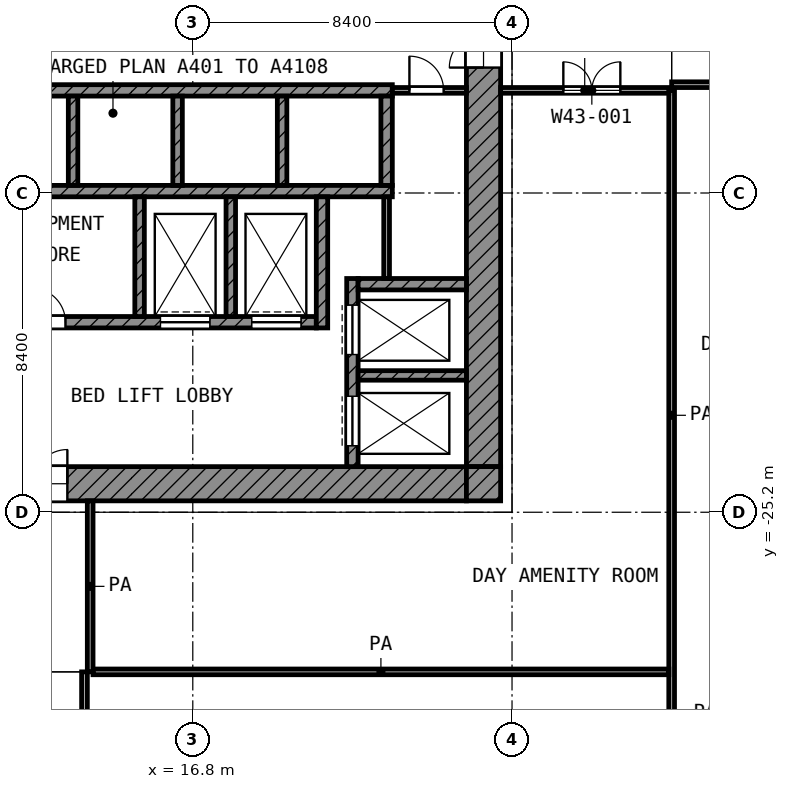
"""IFC4 building model, lengths in metres.
Left out: names, types, materials, properties, quantities, classifications, styles, units other than length and angle.
Written with IfcOpenShell. Run it as: python <this file> out.ifc"""

import sys

from ifc_helpers import new_model, si_unit, direction, frame, frame_2d, origin, place, context, subcontext, project, spatial, rectangle, extrude, element, fill, save


model = new_model("IFC4")
c1 = context("Model", 3, precision=1e-05, world=origin(), true_north=direction((0.0, 1.0)))
c2 = subcontext(c1, "Body", "Model", "MODEL_VIEW")
j1 = project(units=[si_unit("LENGTHUNIT", "METRE"), si_unit("PLANEANGLEUNIT", "RADIAN")], contexts=[c1])
p1 = place(None, origin())
s1 = spatial("IfcSite", under=j1, at=p1, CompositionType="ELEMENT")
p2 = place(p1, origin())
s2 = spatial("IfcBuilding", under=s1, at=p2, CompositionType="ELEMENT")
p3 = place(p2, frame((0.0, 0.0, 187.8)))
s3 = spatial("IfcBuildingStorey", under=s2, at=p3, CompositionType="ELEMENT", Elevation=187.8)
p4 = place(p3, frame((24.45, -24.0, 0.0), z_axis=(0.0, 0.0, 1.0), x_axis=(0.0, 1.0, 0.0)))
e1 = element("IfcWall", 1, at=p4, inside=s3, PredefinedType="SHEAR", context=c2, shape_type="SweptSolid", body=[
    extrude(rectangle(XDim=18.6, YDim=0.9, at=frame_2d((9.3, 0.0))), origin(), (0.0, 0.0, 1.0), 3.6),
])
p5 = place(p4, frame((10.5, 0.0, 0.0)))
e2 = element("IfcOpeningElement", 2, at=p5, cuts=e1, PredefinedType="OPENING", context=c2, shape_type="SweptSolid", body=[
    extrude(rectangle(XDim=1.8, YDim=2.1, at=frame_2d((0.9, 1.05))), frame((0.0, 0.46, 0.0), z_axis=(0.0, -1.0, 0.0), x_axis=(1.0, 0.0, 0.0)), (0.0, 0.0, 1.0), 0.92),
])
p6 = place(p3, frame((5.4, -24.45, 0.0), z_axis=(0.0, 0.0, 1.0), x_axis=(1.0, 0.0, 0.0)))
e3 = element("IfcWall", 3, at=p6, inside=s3, PredefinedType="SHEAR", context=c2, shape_type="SweptSolid", body=[
    extrude(rectangle(XDim=18.6, YDim=0.9, at=frame_2d((9.3, 0.0))), origin(), (0.0, 0.0, 1.0), 3.6),
])
p7 = place(p6, frame((6.3, 0.0, 0.0)))
e4 = element("IfcOpeningElement", 4, at=p7, cuts=e3, PredefinedType="OPENING", context=c2, shape_type="SweptSolid", body=[
    extrude(rectangle(XDim=1.8, YDim=2.1, at=frame_2d((0.9, 1.05))), frame((0.0, 0.46, 0.0), z_axis=(0.0, -1.0, 0.0), x_axis=(1.0, 0.0, 0.0)), (0.0, 0.0, 1.0), 0.92),
])
p8 = place(p3, frame((24.45, -24.9, 0.0), z_axis=(0.0, 0.0, 1.0), x_axis=(0.0, 1.0, 0.0)))
e5 = element("IfcWall", 5, at=p8, inside=s3, PredefinedType="SHEAR", context=c2, shape_type="SweptSolid", body=[
    extrude(rectangle(XDim=0.9, YDim=0.9, at=frame_2d((0.45, 0.0))), origin(), (0.0, 0.0, 1.0), 3.6),
])
p9 = place(p3, frame((5.4, -14.1, 0.0), z_axis=(0.0, 0.0, 1.0), x_axis=(1.0, 0.0, 0.0)))
e6 = element("IfcWall", 6, at=p9, inside=s3, PredefinedType="SHEAR", context=c2, shape_type="SweptSolid", body=[
    extrude(rectangle(XDim=16.65, YDim=0.3, at=frame_2d((8.325, 0.0))), origin(), (0.0, 0.0, 1.0), 3.6),
])
p10 = place(p9, frame((0.825, 0.0, 0.0)))
e7 = element("IfcOpeningElement", 7, at=p10, cuts=e6, PredefinedType="OPENING", context=c2, shape_type="SweptSolid", body=[
    extrude(rectangle(XDim=1.1, YDim=2.1, at=frame_2d((0.55, 1.05))), frame((0.0, 0.16, 0.0), z_axis=(0.0, -1.0, 0.0), x_axis=(1.0, 0.0, 0.0)), (0.0, 0.0, 1.0), 0.32),
])
p11 = place(p9, frame((3.575, 0.0, 0.0)))
e8 = element("IfcOpeningElement", 8, at=p11, cuts=e6, PredefinedType="OPENING", context=c2, shape_type="SweptSolid", body=[
    extrude(rectangle(XDim=1.1, YDim=2.1, at=frame_2d((0.55, 1.05))), frame((0.0, 0.16, 0.0), z_axis=(0.0, -1.0, 0.0), x_axis=(1.0, 0.0, 0.0)), (0.0, 0.0, 1.0), 0.32),
])
p12 = place(p3, frame((5.4, -16.75, 0.0), z_axis=(0.0, 0.0, 1.0), x_axis=(1.0, 0.0, 0.0)))
e9 = element("IfcWall", 9, at=p12, inside=s3, PredefinedType="SHEAR", context=c2, shape_type="SweptSolid", body=[
    extrude(rectangle(XDim=16.65, YDim=0.3, at=frame_2d((8.325, 0.0))), origin(), (0.0, 0.0, 1.0), 3.6),
])
p13 = place(p3, frame((5.4, -20.2, 0.0), z_axis=(0.0, 0.0, 1.0), x_axis=(1.0, 0.0, 0.0)))
e10 = element("IfcWall", 10, at=p13, inside=s3, PredefinedType="SHEAR", context=c2, shape_type="SweptSolid", body=[
    extrude(rectangle(XDim=14.65, YDim=0.3, at=frame_2d((7.325, 0.0))), origin(), (0.0, 0.0, 1.0), 3.6),
])
p14 = place(p13, frame((10.55, 0.0, 0.0)))
e11 = element("IfcOpeningElement", 11, at=p14, cuts=e10, PredefinedType="OPENING", context=c2, shape_type="SweptSolid", body=[
    extrude(rectangle(XDim=1.3, YDim=2.1, at=frame_2d((0.65, 1.05))), frame((0.0, 0.16, 0.0), z_axis=(0.0, -1.0, 0.0), x_axis=(1.0, 0.0, 0.0)), (0.0, 0.0, 1.0), 0.32),
])
p15 = place(p13, frame((12.95, 0.0, 0.0)))
e12 = element("IfcOpeningElement", 12, at=p15, cuts=e10, PredefinedType="OPENING", context=c2, shape_type="SweptSolid", body=[
    extrude(rectangle(XDim=1.3, YDim=2.1, at=frame_2d((0.65, 1.05))), frame((0.0, 0.16, 0.0), z_axis=(0.0, -1.0, 0.0), x_axis=(1.0, 0.0, 0.0)), (0.0, 0.0, 1.0), 0.32),
])
p16 = place(p13, frame((0.55, 0.0, 0.0)))
e13 = element("IfcOpeningElement", 13, at=p16, cuts=e10, PredefinedType="OPENING", context=c2, shape_type="SweptSolid", body=[
    extrude(rectangle(XDim=1.3, YDim=2.1, at=frame_2d((0.65, 1.05))), frame((0.0, 0.16, 0.0), z_axis=(0.0, -1.0, 0.0), x_axis=(1.0, 0.0, 0.0)), (0.0, 0.0, 1.0), 0.32),
])
p17 = place(p13, frame((2.95, 0.0, 0.0)))
e14 = element("IfcOpeningElement", 14, at=p17, cuts=e10, PredefinedType="OPENING", context=c2, shape_type="SweptSolid", body=[
    extrude(rectangle(XDim=1.3, YDim=2.1, at=frame_2d((0.65, 1.05))), frame((0.0, 0.16, 0.0), z_axis=(0.0, -1.0, 0.0), x_axis=(1.0, 0.0, 0.0)), (0.0, 0.0, 1.0), 0.32),
])
p18 = place(p13, frame((7.15, 0.0, 0.0)))
e15 = element("IfcOpeningElement", 15, at=p18, cuts=e10, PredefinedType="OPENING", context=c2, shape_type="SweptSolid", body=[
    extrude(rectangle(XDim=0.9, YDim=2.1, at=frame_2d((0.45, 1.05))), frame((0.0, 0.16, 0.0), z_axis=(0.0, -1.0, 0.0), x_axis=(1.0, 0.0, 0.0)), (0.0, 0.0, 1.0), 0.32),
])
p19 = place(p3, frame((20.2, -20.35, 0.0), z_axis=(0.0, 0.0, 1.0), x_axis=(0.0, 1.0, 0.0)))
e16 = element("IfcWall", 16, at=p19, inside=s3, PredefinedType="SHEAR", context=c2, shape_type="SweptSolid", body=[
    extrude(rectangle(XDim=3.45, YDim=0.3, at=frame_2d((1.725, 0.0))), origin(), (0.0, 0.0, 1.0), 3.6),
])
p20 = place(p3, frame((21.9, -16.6, 0.0), z_axis=(0.0, 0.0, 1.0), x_axis=(0.0, 1.0, 0.0)))
e17 = element("IfcWall", 17, at=p20, inside=s3, PredefinedType="SHEAR", context=c2, shape_type="SweptSolid", body=[
    extrude(rectangle(XDim=2.35, YDim=0.3, at=frame_2d((1.175, 0.0))), origin(), (0.0, 0.0, 1.0), 3.6),
])
p21 = place(p3, frame((21.15, -19.2, 0.0), z_axis=(0.0, 0.0, 1.0), x_axis=(1.0, 0.0, 0.0)))
e18 = element("IfcWall", 18, at=p21, inside=s3, PredefinedType="SHEAR", context=c2, shape_type="SweptSolid", body=[
    extrude(rectangle(XDim=2.85, YDim=0.3, at=frame_2d((1.425, 0.0))), origin(), (0.0, 0.0, 1.0), 3.6),
])
p22 = place(p3, frame((21.0, -24.0, 0.0), z_axis=(0.0, 0.0, 1.0), x_axis=(0.0, 1.0, 0.0)))
e19 = element("IfcWall", 19, at=p22, inside=s3, PredefinedType="SHEAR", context=c2, shape_type="SweptSolid", body=[
    extrude(rectangle(XDim=4.95, YDim=0.3, at=frame_2d((2.475, 0.0))), origin(), (0.0, 0.0, 1.0), 3.6),
])
p23 = place(p22, frame((2.95, 0.0, 0.0)))
e20 = element("IfcOpeningElement", 20, at=p23, cuts=e19, PredefinedType="OPENING", context=c2, shape_type="SweptSolid", body=[
    extrude(rectangle(XDim=1.3, YDim=2.1, at=frame_2d((0.65, 1.05))), frame((0.0, 0.16, 0.0), z_axis=(0.0, -1.0, 0.0), x_axis=(1.0, 0.0, 0.0)), (0.0, 0.0, 1.0), 0.32),
])
p24 = place(p22, frame((0.55, 0.0, 0.0)))
e21 = element("IfcOpeningElement", 21, at=p24, cuts=e19, PredefinedType="OPENING", context=c2, shape_type="SweptSolid", body=[
    extrude(rectangle(XDim=1.3, YDim=2.1, at=frame_2d((0.65, 1.05))), frame((0.0, 0.16, 0.0), z_axis=(0.0, -1.0, 0.0), x_axis=(1.0, 0.0, 0.0)), (0.0, 0.0, 1.0), 0.32),
])
p25 = place(p3, frame((21.15, -21.6, 0.0), z_axis=(0.0, 0.0, 1.0), x_axis=(1.0, 0.0, 0.0)))
e22 = element("IfcWall", 22, at=p25, inside=s3, PredefinedType="SHEAR", context=c2, shape_type="SweptSolid", body=[
    extrude(rectangle(XDim=2.85, YDim=0.25, at=frame_2d((1.425, 0.0))), origin(), (0.0, 0.0, 1.0), 3.6),
])
for number, where, z_axis, x_axis in (
    (23, (15.4, -20.05, 0.0), (0.0, 0.0, 1.0), (0.0, 1.0, 0.0)),
    (24, (17.8, -20.05, 0.0), (0.0, 0.0, 1.0), (0.0, 1.0, 0.0)),
):
    element("IfcWall", number, at=place(p3, frame(where, z_axis=z_axis, x_axis=x_axis)), inside=s3, PredefinedType="SHEAR", context=c2, shape_type="SweptSolid", body=[
        extrude(rectangle(XDim=3.15, YDim=0.25, at=frame_2d((1.575, 0.0))), origin(), (0.0, 0.0, 1.0), 3.6),
    ])
for number, where, z_axis, x_axis in (
    (25, (13.65, -16.6, 0.0), (0.0, 0.0, 1.0), (0.0, 1.0, 0.0)),
    (26, (16.4, -16.6, 0.0), (0.0, 0.0, 1.0), (0.0, 1.0, 0.0)),
    (27, (19.15, -16.6, 0.0), (0.0, 0.0, 1.0), (0.0, 1.0, 0.0)),
):
    element("IfcWall", number, at=place(p3, frame(where, z_axis=z_axis, x_axis=x_axis)), inside=s3, PredefinedType="SHEAR", context=c2, shape_type="SweptSolid", body=[
        extrude(rectangle(XDim=2.35, YDim=0.25, at=frame_2d((1.175, 0.0))), origin(), (0.0, 0.0, 1.0), 3.6),
    ])
p26 = place(p3, frame((21.9, -19.05, 0.0), z_axis=(0.0, 0.0, 1.0), x_axis=(0.0, 1.0, 0.0)))
e28 = element("IfcWall", 28, at=p26, inside=s3, PredefinedType="PARTITIONING", context=c2, shape_type="SweptSolid", body=[
    extrude(rectangle(XDim=2.15, YDim=0.15, at=frame_2d((1.075, 0.0))), origin(), (0.0, 0.0, 1.0), 3.6),
])
p27 = place(p3, frame((22.05, -14.1, 0.0), z_axis=(0.0, 0.0, 1.0), x_axis=(1.0, 0.0, 0.0)))
e29 = element("IfcWall", 29, at=p27, inside=s3, PredefinedType="PARTITIONING", context=c2, shape_type="SweptSolid", body=[
    extrude(rectangle(XDim=1.95, YDim=0.15, at=frame_2d((0.975, 0.0))), origin(), (0.0, 0.0, 1.0), 3.6),
])
p28 = place(p27, frame((0.45, 0.0, 0.0)))
e30 = element("IfcOpeningElement", 30, at=p28, cuts=e29, PredefinedType="OPENING", context=c2, shape_type="SweptSolid", body=[
    extrude(rectangle(XDim=0.9, YDim=2.1, at=frame_2d((0.45, 1.05))), frame((0.0, 0.085, 0.0), z_axis=(0.0, -1.0, 0.0), x_axis=(1.0, 0.0, 0.0)), (0.0, 0.0, 1.0), 0.17),
])
p29 = place(p3, frame((14.175, -29.4, 0.0), z_axis=(0.0, 0.0, 1.0), x_axis=(1.0, 0.0, 0.0)))
e31 = element("IfcWall", 31, at=p29, inside=s3, PredefinedType="PARTITIONING", context=c2, shape_type="SweptSolid", body=[
    extrude(rectangle(XDim=15.15, YDim=0.15, at=frame_2d((7.575, 0.0))), origin(), (0.0, 0.0, 1.0), 3.6),
])
p30 = place(p3, frame((24.9, -14.1, 0.0), z_axis=(0.0, 0.0, 1.0), x_axis=(1.0, 0.0, 0.0)))
e32 = element("IfcWall", 32, at=p30, inside=s3, PredefinedType="PARTITIONING", context=c2, shape_type="SweptSolid", body=[
    extrude(rectangle(XDim=4.425, YDim=0.15, at=frame_2d((2.212, 0.0))), origin(), (0.0, 0.0, 1.0), 3.6),
])
p31 = place(p30, frame((1.65, 0.0, 0.0)))
e33 = element("IfcOpeningElement", 33, at=p31, cuts=e32, PredefinedType="OPENING", context=c2, shape_type="SweptSolid", body=[
    extrude(rectangle(XDim=1.5, YDim=2.1, at=frame_2d((0.75, 1.05))), frame((0.0, 0.085, 0.0), z_axis=(0.0, -1.0, 0.0), x_axis=(1.0, 0.0, 0.0)), (0.0, 0.0, 1.0), 0.17),
])
p32 = place(p3, frame((29.4, -13.95, 0.0), z_axis=(0.0, 0.0, 1.0), x_axis=(1.0, 0.0, 0.0)))
e34 = element("IfcWall", 34, at=p32, inside=s3, PredefinedType="PARTITIONING", context=c2, shape_type="SweptSolid", body=[
    extrude(rectangle(XDim=37.72, YDim=0.15, at=frame_2d((18.86, 0.0))), origin(), (0.0, 0.0, 1.0), 3.6),
])
p33 = place(p32, frame((1.6, 0.0, 0.0)))
e35 = element("IfcOpeningElement", 35, at=p33, cuts=e34, PredefinedType="OPENING", context=c2, shape_type="SweptSolid", body=[
    extrude(rectangle(XDim=1.0, YDim=2.1, at=frame_2d((0.5, 1.05))), frame((0.0, 0.085, 0.0), z_axis=(0.0, -1.0, 0.0), x_axis=(1.0, 0.0, 0.0)), (0.0, 0.0, 1.0), 0.17),
])
p34 = place(p32, frame((6.0, 0.0, 0.0)))
e36 = element("IfcOpeningElement", 36, at=p34, cuts=e34, PredefinedType="OPENING", context=c2, shape_type="SweptSolid", body=[
    extrude(rectangle(XDim=1.2, YDim=2.1, at=frame_2d((0.6, 1.05))), frame((0.0, 0.085, 0.0), z_axis=(0.0, -1.0, 0.0), x_axis=(1.0, 0.0, 0.0)), (0.0, 0.0, 1.0), 0.17),
])
p35 = place(p32, frame((12.975, 0.0, 0.0)))
e37 = element("IfcOpeningElement", 37, at=p35, cuts=e34, PredefinedType="OPENING", context=c2, shape_type="SweptSolid", body=[
    extrude(rectangle(XDim=1.2, YDim=2.1, at=frame_2d((0.6, 1.05))), frame((0.0, 0.085, 0.0), z_axis=(0.0, -1.0, 0.0), x_axis=(1.0, 0.0, 0.0)), (0.0, 0.0, 1.0), 0.17),
])
p36 = place(p32, frame((11.45, 0.0, 0.0)))
e38 = element("IfcOpeningElement", 38, at=p36, cuts=e34, PredefinedType="OPENING", context=c2, shape_type="SweptSolid", body=[
    extrude(rectangle(XDim=1.2, YDim=2.1, at=frame_2d((0.6, 1.05))), frame((0.0, 0.085, 0.0), z_axis=(0.0, -1.0, 0.0), x_axis=(1.0, 0.0, 0.0)), (0.0, 0.0, 1.0), 0.17),
])
p37 = place(p32, frame((14.85, 0.0, 0.0)))
e39 = element("IfcOpeningElement", 39, at=p37, cuts=e34, PredefinedType="OPENING", context=c2, shape_type="SweptSolid", body=[
    extrude(rectangle(XDim=1.2, YDim=2.1, at=frame_2d((0.6, 1.05))), frame((0.0, 0.085, 0.0), z_axis=(0.0, -1.0, 0.0), x_axis=(1.0, 0.0, 0.0)), (0.0, 0.0, 1.0), 0.17),
])
p38 = place(p32, frame((21.6, 0.0, 0.0)))
e40 = element("IfcOpeningElement", 40, at=p38, cuts=e34, PredefinedType="OPENING", context=c2, shape_type="SweptSolid", body=[
    extrude(rectangle(XDim=1.2, YDim=2.1, at=frame_2d((0.6, 1.05))), frame((0.0, 0.085, 0.0), z_axis=(0.0, -1.0, 0.0), x_axis=(1.0, 0.0, 0.0)), (0.0, 0.0, 1.0), 0.17),
])
p39 = place(p32, frame((20.1, 0.0, 0.0)))
e41 = element("IfcOpeningElement", 41, at=p39, cuts=e34, PredefinedType="OPENING", context=c2, shape_type="SweptSolid", body=[
    extrude(rectangle(XDim=1.2, YDim=2.1, at=frame_2d((0.6, 1.05))), frame((0.0, 0.085, 0.0), z_axis=(0.0, -1.0, 0.0), x_axis=(1.0, 0.0, 0.0)), (0.0, 0.0, 1.0), 0.17),
])
p40 = place(p32, frame((18.85, 0.0, 0.0)))
e42 = element("IfcOpeningElement", 42, at=p40, cuts=e34, PredefinedType="OPENING", context=c2, shape_type="SweptSolid", body=[
    extrude(rectangle(XDim=0.9, YDim=2.1, at=frame_2d((0.45, 1.05))), frame((0.0, 0.085, 0.0), z_axis=(0.0, -1.0, 0.0), x_axis=(1.0, 0.0, 0.0)), (0.0, 0.0, 1.0), 0.17),
])
p41 = place(p32, frame((23.85, 0.0, 0.0)))
e43 = element("IfcOpeningElement", 43, at=p41, cuts=e34, PredefinedType="OPENING", context=c2, shape_type="SweptSolid", body=[
    extrude(rectangle(XDim=1.2, YDim=2.1, at=frame_2d((0.6, 1.05))), frame((0.0, 0.085, 0.0), z_axis=(0.0, -1.0, 0.0), x_axis=(1.0, 0.0, 0.0)), (0.0, 0.0, 1.0), 0.17),
])
p42 = place(p32, frame((29.475, 0.0, 0.0)))
e44 = element("IfcOpeningElement", 44, at=p42, cuts=e34, PredefinedType="OPENING", context=c2, shape_type="SweptSolid", body=[
    extrude(rectangle(XDim=1.2, YDim=2.1, at=frame_2d((0.6, 1.05))), frame((0.0, 0.085, 0.0), z_axis=(0.0, -1.0, 0.0), x_axis=(1.0, 0.0, 0.0)), (0.0, 0.0, 1.0), 0.17),
])
p43 = place(p32, frame((27.95, 0.0, 0.0)))
e45 = element("IfcOpeningElement", 45, at=p43, cuts=e34, PredefinedType="OPENING", context=c2, shape_type="SweptSolid", body=[
    extrude(rectangle(XDim=1.2, YDim=2.1, at=frame_2d((0.6, 1.05))), frame((0.0, 0.085, 0.0), z_axis=(0.0, -1.0, 0.0), x_axis=(1.0, 0.0, 0.0)), (0.0, 0.0, 1.0), 0.17),
])
p44 = place(p32, frame((31.35, 0.0, 0.0)))
e46 = element("IfcOpeningElement", 46, at=p44, cuts=e34, PredefinedType="OPENING", context=c2, shape_type="SweptSolid", body=[
    extrude(rectangle(XDim=1.2, YDim=2.1, at=frame_2d((0.6, 1.05))), frame((0.0, 0.085, 0.0), z_axis=(0.0, -1.0, 0.0), x_axis=(1.0, 0.0, 0.0)), (0.0, 0.0, 1.0), 0.17),
])
p45 = place(p32, frame((34.9, 0.0, 0.0)))
e47 = element("IfcOpeningElement", 47, at=p45, cuts=e34, PredefinedType="OPENING", context=c2, shape_type="SweptSolid", body=[
    extrude(rectangle(XDim=1.0, YDim=2.1, at=frame_2d((0.5, 1.05))), frame((0.0, 0.085, 0.0), z_axis=(0.0, -1.0, 0.0), x_axis=(1.0, 0.0, 0.0)), (0.0, 0.0, 1.0), 0.17),
])
p46 = place(p3, frame((13.95, -54.52, 0.0), z_axis=(0.0, 0.0, 1.0), x_axis=(0.0, 1.0, 0.0)))
e48 = element("IfcWall", 48, at=p46, inside=s3, PredefinedType="PARTITIONING", context=c2, shape_type="SweptSolid", body=[
    extrude(rectangle(XDim=25.12, YDim=0.15, at=frame_2d((12.56, 0.0))), origin(), (0.0, 0.0, 1.0), 3.6),
])
p47 = place(p46, frame((20.02, 0.0, 0.0)))
e49 = element("IfcOpeningElement", 49, at=p47, cuts=e48, PredefinedType="OPENING", context=c2, shape_type="SweptSolid", body=[
    extrude(rectangle(XDim=1.2, YDim=2.1, at=frame_2d((0.6, 1.05))), frame((0.0, 0.085, 0.0), z_axis=(0.0, -1.0, 0.0), x_axis=(1.0, 0.0, 0.0)), (0.0, 0.0, 1.0), 0.17),
])
p48 = place(p46, frame((12.595, 0.0, 0.0)))
e50 = element("IfcOpeningElement", 50, at=p48, cuts=e48, PredefinedType="OPENING", context=c2, shape_type="SweptSolid", body=[
    extrude(rectangle(XDim=1.2, YDim=2.1, at=frame_2d((0.6, 1.05))), frame((0.0, 0.085, 0.0), z_axis=(0.0, -1.0, 0.0), x_axis=(1.0, 0.0, 0.0)), (0.0, 0.0, 1.0), 0.17),
])
p49 = place(p46, frame((11.07, 0.0, 0.0)))
e51 = element("IfcOpeningElement", 51, at=p49, cuts=e48, PredefinedType="OPENING", context=c2, shape_type="SweptSolid", body=[
    extrude(rectangle(XDim=1.2, YDim=2.1, at=frame_2d((0.6, 1.05))), frame((0.0, 0.085, 0.0), z_axis=(0.0, -1.0, 0.0), x_axis=(1.0, 0.0, 0.0)), (0.0, 0.0, 1.0), 0.17),
])
p50 = place(p46, frame((9.07, 0.0, 0.0)))
e52 = element("IfcOpeningElement", 52, at=p50, cuts=e48, PredefinedType="OPENING", context=c2, shape_type="SweptSolid", body=[
    extrude(rectangle(XDim=1.2, YDim=2.1, at=frame_2d((0.6, 1.05))), frame((0.0, 0.085, 0.0), z_axis=(0.0, -1.0, 0.0), x_axis=(1.0, 0.0, 0.0)), (0.0, 0.0, 1.0), 0.17),
])
p51 = place(p46, frame((5.12, 0.0, 0.0)))
e53 = element("IfcOpeningElement", 53, at=p51, cuts=e48, PredefinedType="OPENING", context=c2, shape_type="SweptSolid", body=[
    extrude(rectangle(XDim=1.2, YDim=2.1, at=frame_2d((0.6, 1.05))), frame((0.0, 0.085, 0.0), z_axis=(0.0, -1.0, 0.0), x_axis=(1.0, 0.0, 0.0)), (0.0, 0.0, 1.0), 0.17),
])
p52 = place(p46, frame((1.52, 0.0, 0.0)))
e54 = element("IfcOpeningElement", 54, at=p52, cuts=e48, PredefinedType="OPENING", context=c2, shape_type="SweptSolid", body=[
    extrude(rectangle(XDim=1.0, YDim=2.1, at=frame_2d((0.5, 1.05))), frame((0.0, 0.085, 0.0), z_axis=(0.0, -1.0, 0.0), x_axis=(1.0, 0.0, 0.0)), (0.0, 0.0, 1.0), 0.17),
])
p53 = place(p3, frame((14.1, -29.4, 0.0), z_axis=(0.0, 0.0, 1.0), x_axis=(0.0, 1.0, 0.0)))
e55 = element("IfcWall", 55, at=p53, inside=s3, PredefinedType="PARTITIONING", context=c2, shape_type="SweptSolid", body=[
    extrude(rectangle(XDim=4.5, YDim=0.15, at=frame_2d((2.25, 0.0))), origin(), (0.0, 0.0, 1.0), 3.6),
])
p54 = place(p3, frame((29.4, -31.198, 0.0), z_axis=(0.0, 0.0, 1.0), x_axis=(0.0, 1.0, 0.0)))
e56 = element("IfcWall", 56, at=p54, inside=s3, PredefinedType="PARTITIONING", context=c2, shape_type="SweptSolid", body=[
    extrude(rectangle(XDim=17.098, YDim=0.15, at=frame_2d((8.549, 0.0))), origin(), (0.0, 0.0, 1.0), 3.6),
])
p55 = place(p23, origin())
e57 = element("IfcDoor", 57, at=p55, inside=s3, OperationType="DOUBLE_DOOR_SLIDING", PredefinedType="DOOR", context=c2, shape_type="SweptSolid", body=[
    extrude(rectangle(XDim=1.3, YDim=2.1, at=frame_2d((0.65, 1.05))), frame((0.0, 0.025, 0.0), z_axis=(0.0, -1.0, 0.0), x_axis=(1.0, 0.0, 0.0)), (0.0, 0.0, 1.0), 0.05),
])
fill(e20, e57)
p56 = place(p24, origin())
e58 = element("IfcDoor", 58, at=p56, inside=s3, OperationType="DOUBLE_DOOR_SLIDING", PredefinedType="DOOR", context=c2, shape_type="SweptSolid", body=[
    extrude(rectangle(XDim=1.3, YDim=2.1, at=frame_2d((0.65, 1.05))), frame((0.0, 0.025, 0.0), z_axis=(0.0, -1.0, 0.0), x_axis=(1.0, 0.0, 0.0)), (0.0, 0.0, 1.0), 0.05),
])
fill(e21, e58)
p57 = place(p14, origin())
e59 = element("IfcDoor", 59, at=p57, inside=s3, OperationType="DOUBLE_DOOR_SLIDING", PredefinedType="DOOR", context=c2, shape_type="SweptSolid", body=[
    extrude(rectangle(XDim=1.3, YDim=2.1, at=frame_2d((0.65, 1.05))), frame((0.0, 0.025, 0.0), z_axis=(0.0, -1.0, 0.0), x_axis=(1.0, 0.0, 0.0)), (0.0, 0.0, 1.0), 0.05),
])
fill(e11, e59)
p58 = place(p15, origin())
e60 = element("IfcDoor", 60, at=p58, inside=s3, OperationType="DOUBLE_DOOR_SLIDING", PredefinedType="DOOR", context=c2, shape_type="SweptSolid", body=[
    extrude(rectangle(XDim=1.3, YDim=2.1, at=frame_2d((0.65, 1.05))), frame((0.0, 0.025, 0.0), z_axis=(0.0, -1.0, 0.0), x_axis=(1.0, 0.0, 0.0)), (0.0, 0.0, 1.0), 0.05),
])
fill(e12, e60)
p59 = place(p5, origin())
e61 = element("IfcDoor", 61, at=p59, inside=s3, OperationType="DOUBLE_DOOR_SINGLE_SWING", PredefinedType="DOOR", context=c2, shape_type="SweptSolid", body=[
    extrude(rectangle(XDim=1.8, YDim=2.1, at=frame_2d((0.9, 1.05))), frame((0.0, 0.025, 0.0), z_axis=(0.0, -1.0, 0.0), x_axis=(1.0, 0.0, 0.0)), (0.0, 0.0, 1.0), 0.05),
])
fill(e2, e61)
p60 = place(p7, origin())
e62 = element("IfcDoor", 62, at=p60, inside=s3, OperationType="DOUBLE_DOOR_SINGLE_SWING", PredefinedType="DOOR", context=c2, shape_type="SweptSolid", body=[
    extrude(rectangle(XDim=1.8, YDim=2.1, at=frame_2d((0.9, 1.05))), frame((0.0, 0.025, 0.0), z_axis=(0.0, -1.0, 0.0), x_axis=(1.0, 0.0, 0.0)), (0.0, 0.0, 1.0), 0.05),
])
fill(e4, e62)
p61 = place(p28, origin())
e63 = element("IfcDoor", 63, at=p61, inside=s3, OperationType="SINGLE_SWING_LEFT", PredefinedType="DOOR", context=c2, shape_type="SweptSolid", body=[
    extrude(rectangle(XDim=0.9, YDim=2.1, at=frame_2d((0.45, 1.05))), frame((0.0, 0.025, 0.0), z_axis=(0.0, -1.0, 0.0), x_axis=(1.0, 0.0, 0.0)), (0.0, 0.0, 1.0), 0.05),
])
fill(e30, e63)
p62 = place(p18, origin())
e64 = element("IfcDoor", 64, at=p62, inside=s3, OperationType="SINGLE_SWING_LEFT", PredefinedType="DOOR", context=c2, shape_type="SweptSolid", body=[
    extrude(rectangle(XDim=0.9, YDim=2.1, at=frame_2d((0.45, 1.05))), frame((0.0, 0.025, 0.0), z_axis=(0.0, -1.0, 0.0), x_axis=(1.0, 0.0, 0.0)), (0.0, 0.0, 1.0), 0.05),
])
fill(e15, e64)
p63 = place(p31, origin())
e65 = element("IfcDoor", 65, at=p63, inside=s3, OperationType="DOUBLE_DOOR_SINGLE_SWING", PredefinedType="DOOR", context=c2, shape_type="SweptSolid", body=[
    extrude(rectangle(XDim=1.5, YDim=2.1, at=frame_2d((0.75, 1.05))), frame((0.0, 0.025, 0.0), z_axis=(0.0, -1.0, 0.0), x_axis=(1.0, 0.0, 0.0)), (0.0, 0.0, 1.0), 0.05),
])
fill(e33, e65)
save(model, sys.argv[1])
